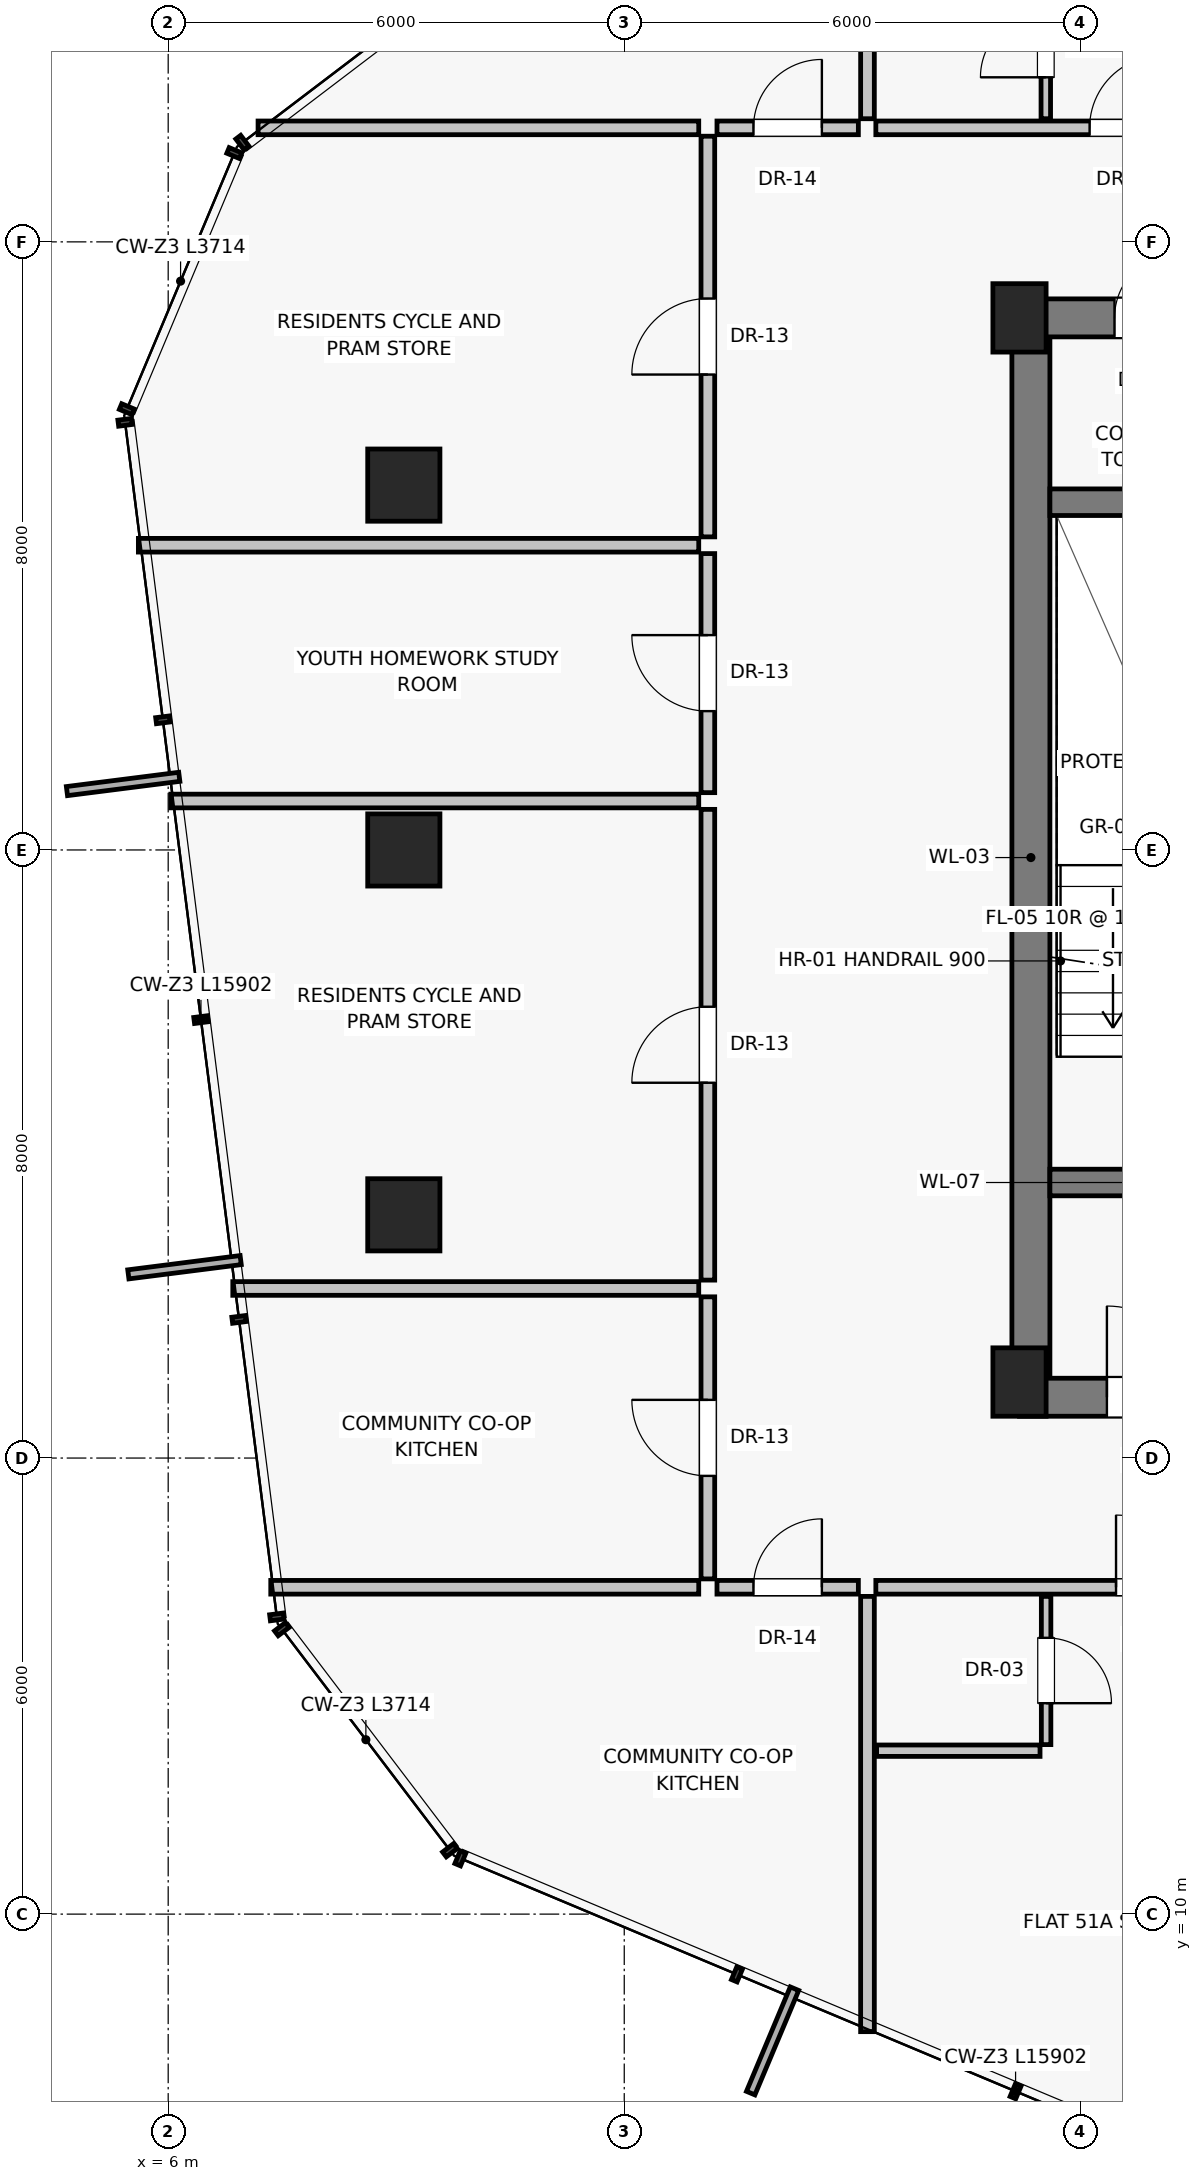
"""IFC4 building model, lengths in metres.
Left out: names, types, materials, properties, quantities, classifications, styles, units other than length and angle.
Written with IfcOpenShell. Run it as: python <this file> out.ifc"""

import sys

from ifc_helpers import new_model, si_unit, direction, frame, frame_2d, origin, origin_2d, place, context, subcontext, project, spatial, rectangle, extrude, source, transform, mapped, element, fill, save


model = new_model("IFC4")
c1 = context("Model", 3, precision=1e-05, world=origin(), true_north=direction((0.0, 1.0)))
c2 = subcontext(c1, "Body", "Model", "MODEL_VIEW")
j1 = project(units=[si_unit("LENGTHUNIT", "METRE"), si_unit("PLANEANGLEUNIT", "RADIAN")], contexts=[c1])
p1 = place(None, origin())
s1 = spatial("IfcSite", under=j1, at=p1, CompositionType="ELEMENT")
p2 = place(p1, origin())
s2 = spatial("IfcBuilding", under=s1, at=p2, CompositionType="ELEMENT")
p3 = place(p2, frame((0.0, 0.0, 182.1)))
s3 = spatial("IfcBuildingStorey", under=s2, at=p3, CompositionType="ELEMENT", Elevation=182.1)
for number, where, z_axis, x_axis in (
    (1, (17.2, 17.0, 0.0), (0.0, 0.0, 1.0), (1.0, 0.0, 0.0)),
    (2, (17.2, 31.0, 0.0), (0.0, 0.0, 1.0), (1.0, 0.0, 0.0)),
):
    element("IfcColumn", number, at=place(p3, frame(where, z_axis=z_axis, x_axis=x_axis)), inside=s3, PredefinedType="PILASTER", context=c2, shape_type="SweptSolid", body=[
        extrude(rectangle(XDim=0.7, YDim=0.9, at=origin_2d()), origin(), (0.0, 0.0, 1.0), 3.25),
    ])
for number, where, z_axis, x_axis in (
    (3, (9.1, 28.8, 0.0), (0.0, 0.0, 1.0), (1.0, 0.0, 0.0)),
    (4, (9.1, 24.0, 0.0), (0.0, 0.0, 1.0), (1.0, 0.0, 0.0)),
    (5, (9.1, 19.2, 0.0), (0.0, 0.0, 1.0), (1.0, 0.0, 0.0)),
):
    element("IfcColumn", number, at=place(p3, frame(where, z_axis=z_axis, x_axis=x_axis)), inside=s3, PredefinedType="COLUMN", context=c2, shape_type="SweptSolid", body=[
        extrude(rectangle(XDim=0.95, YDim=0.95, at=origin_2d()), origin(), (0.0, 0.0, 1.0), 3.25),
    ])
p4 = place(p3, frame((17.35, 16.8, 0.0), z_axis=(0.0, 0.0, 1.0), x_axis=(0.0, 1.0, 0.0)))
e6 = element("IfcWall", 6, at=p4, inside=s3, PredefinedType="SHEAR", context=c2, shape_type="SweptSolid", body=[
    extrude(rectangle(XDim=14.2, YDim=0.5, at=frame_2d((7.1, 0.0))), origin(), (0.0, 0.0, 1.0), 3.015),
])
p5 = place(p3, frame((17.2, 16.8, 0.0), z_axis=(0.0, 0.0, 1.0), x_axis=(1.0, 0.0, 0.0)))
e7 = element("IfcWall", 7, at=p5, inside=s3, PredefinedType="SHEAR", context=c2, shape_type="SweptSolid", body=[
    extrude(rectangle(XDim=5.85, YDim=0.5, at=frame_2d((2.925, 0.0))), origin(), (0.0, 0.0, 1.0), 3.015),
])
p6 = place(p5, frame((1.15, 0.0, 0.0)))
e8 = element("IfcOpeningElement", 8, at=p6, cuts=e7, PredefinedType="OPENING", context=c2, shape_type="SweptSolid", body=[
    extrude(rectangle(XDim=1.2, YDim=2.03, at=frame_2d((0.6, 1.015))), frame((0.0, 0.26, 0.0), z_axis=(0.0, -1.0, 0.0), x_axis=(1.0, 0.0, 0.0)), (0.0, 0.0, 1.0), 0.52),
])
p7 = place(p3, frame((17.2, 31.0, 0.0), z_axis=(0.0, 0.0, 1.0), x_axis=(1.0, 0.0, 0.0)))
e9 = element("IfcWall", 9, at=p7, inside=s3, PredefinedType="SHEAR", context=c2, shape_type="SweptSolid", body=[
    extrude(rectangle(XDim=3.8, YDim=0.5, at=frame_2d((1.9, 0.0))), origin(), (0.0, 0.0, 1.0), 3.015),
])
p8 = place(p7, frame((1.25, 0.0, 0.0)))
e10 = element("IfcOpeningElement", 10, at=p8, cuts=e9, PredefinedType="OPENING", context=c2, shape_type="SweptSolid", body=[
    extrude(rectangle(XDim=0.86, YDim=2.01, at=frame_2d((0.43, 1.005))), frame((0.0, 0.26, 0.0), z_axis=(0.0, -1.0, 0.0), x_axis=(1.0, 0.0, 0.0)), (0.0, 0.0, 1.0), 0.52),
])
p9 = place(p3, frame((17.6, 19.625, 0.0), z_axis=(0.0, 0.0, 1.0), x_axis=(1.0, 0.0, 0.0)))
e11 = element("IfcWall", 11, at=p9, inside=s3, PredefinedType="SHEAR", context=c2, shape_type="SweptSolid", body=[
    extrude(rectangle(XDim=3.375, YDim=0.35, at=frame_2d((1.688, 0.0))), origin(), (0.0, 0.0, 1.0), 3.015),
])
p10 = place(p9, frame((1.05, 0.0, 0.0)))
e12 = element("IfcOpeningElement", 12, at=p10, cuts=e11, PredefinedType="OPENING", context=c2, shape_type="SweptSolid", body=[
    extrude(rectangle(XDim=1.1, YDim=2.03, at=frame_2d((0.55, 1.015))), frame((0.0, 0.185, 0.0), z_axis=(0.0, -1.0, 0.0), x_axis=(1.0, 0.0, 0.0)), (0.0, 0.0, 1.0), 0.37),
])
p11 = place(p3, frame((17.6, 28.575, 0.0), z_axis=(0.0, 0.0, 1.0), x_axis=(1.0, 0.0, 0.0)))
e13 = element("IfcWall", 13, at=p11, inside=s3, PredefinedType="SHEAR", context=c2, shape_type="SweptSolid", body=[
    extrude(rectangle(XDim=3.375, YDim=0.35, at=frame_2d((1.688, 0.0))), origin(), (0.0, 0.0, 1.0), 3.015),
])
p12 = place(p3, frame((15.2, 14.18, 0.0), z_axis=(0.0, 0.0, 1.0), x_axis=(0.0, -1.0, 0.0)))
e14 = element("IfcWall", 14, at=p12, inside=s3, PredefinedType="PARTITIONING", context=c2, shape_type="SweptSolid", body=[
    extrude(rectangle(XDim=5.726, YDim=0.18, at=frame_2d((2.863, 0.0))), origin(), (0.0, 0.0, 1.0), 3.015),
])
p13 = place(p3, frame((15.31, 14.3, 0.0), z_axis=(0.0, 0.0, 1.0), x_axis=(1.0, 0.0, 0.0)))
e15 = element("IfcWall", 15, at=p13, inside=s3, PredefinedType="PARTITIONING", context=c2, shape_type="SweptSolid", body=[
    extrude(rectangle(XDim=5.35, YDim=0.18, at=frame_2d((2.675, 0.0))), origin(), (0.0, 0.0, 1.0), 3.015),
])
p14 = place(p13, frame((3.16, 0.0, 0.0)))
e16 = element("IfcOpeningElement", 16, at=p14, cuts=e15, PredefinedType="OPENING", context=c2, shape_type="SweptSolid", body=[
    extrude(rectangle(XDim=0.95, YDim=2.02, at=frame_2d((0.475, 1.01))), frame((0.0, 0.1, 0.0), z_axis=(0.0, -1.0, 0.0), x_axis=(1.0, 0.0, 0.0)), (0.0, 0.0, 1.0), 0.2),
])
p15 = place(p3, frame((17.55, 14.18, 0.0), z_axis=(0.0, 0.0, 1.0), x_axis=(0.0, -1.0, 0.0)))
e17 = element("IfcWall", 17, at=p15, inside=s3, PredefinedType="PARTITIONING", context=c2, shape_type="SweptSolid", body=[
    extrude(rectangle(XDim=1.95, YDim=0.125, at=frame_2d((0.975, 0.0))), origin(), (0.0, 0.0, 1.0), 3.015),
])
p16 = place(p15, frame((0.545, 0.0, 0.0)))
e18 = element("IfcOpeningElement", 18, at=p16, cuts=e17, PredefinedType="OPENING", context=c2, shape_type="SweptSolid", body=[
    extrude(rectangle(XDim=0.86, YDim=2.01, at=frame_2d((0.43, 1.005))), frame((0.0, 0.073, 0.0), z_axis=(0.0, -1.0, 0.0), x_axis=(1.0, 0.0, 0.0)), (0.0, 0.0, 1.0), 0.145),
])
p17 = place(p3, frame((15.32, 12.15, 0.0), z_axis=(0.0, 0.0, 1.0), x_axis=(1.0, 0.0, 0.0)))
e19 = element("IfcWall", 19, at=p17, inside=s3, PredefinedType="PARTITIONING", context=c2, shape_type="SweptSolid", body=[
    extrude(rectangle(XDim=2.15, YDim=0.15, at=frame_2d((1.075, 0.0))), origin(), (0.0, 0.0, 1.0), 3.015),
])
p18 = place(p3, frame((15.2, 33.62, 0.0), z_axis=(0.0, 0.0, 1.0), x_axis=(0.0, 1.0, 0.0)))
e20 = element("IfcWall", 20, at=p18, inside=s3, PredefinedType="PARTITIONING", context=c2, shape_type="SweptSolid", body=[
    extrude(rectangle(XDim=5.974, YDim=0.18, at=frame_2d((2.987, 0.0))), origin(), (0.0, 0.0, 1.0), 3.015),
])
p19 = place(p3, frame((15.31, 33.5, 0.0), z_axis=(0.0, 0.0, 1.0), x_axis=(1.0, 0.0, 0.0)))
e21 = element("IfcWall", 21, at=p19, inside=s3, PredefinedType="PARTITIONING", context=c2, shape_type="SweptSolid", body=[
    extrude(rectangle(XDim=4.88, YDim=0.18, at=frame_2d((2.44, 0.0))), origin(), (0.0, 0.0, 1.0), 3.015),
])
p20 = place(p19, frame((2.812, 0.0, 0.0)))
e22 = element("IfcOpeningElement", 22, at=p20, cuts=e21, PredefinedType="OPENING", context=c2, shape_type="SweptSolid", body=[
    extrude(rectangle(XDim=0.95, YDim=2.02, at=frame_2d((0.475, 1.01))), frame((0.0, 0.1, 0.0), z_axis=(0.0, -1.0, 0.0), x_axis=(1.0, 0.0, 0.0)), (0.0, 0.0, 1.0), 0.2),
])
p21 = place(p3, frame((17.546, 33.62, 0.0), z_axis=(0.0, 0.0, 1.0), x_axis=(0.0, 1.0, 0.0)))
e23 = element("IfcWall", 23, at=p21, inside=s3, PredefinedType="PARTITIONING", context=c2, shape_type="SweptSolid", body=[
    extrude(rectangle(XDim=1.95, YDim=0.125, at=frame_2d((0.975, 0.0))), origin(), (0.0, 0.0, 1.0), 3.015),
])
p22 = place(p21, frame((0.545, 0.0, 0.0)))
e24 = element("IfcOpeningElement", 24, at=p22, cuts=e23, PredefinedType="OPENING", context=c2, shape_type="SweptSolid", body=[
    extrude(rectangle(XDim=0.86, YDim=2.01, at=frame_2d((0.43, 1.005))), frame((0.0, 0.073, 0.0), z_axis=(0.0, -1.0, 0.0), x_axis=(1.0, 0.0, 0.0)), (0.0, 0.0, 1.0), 0.145),
])
p23 = place(p3, frame((12.98, 14.3, 0.0), z_axis=(0.0, 0.0, 1.0), x_axis=(-1.0, 0.0, 0.0)))
e25 = element("IfcWall", 25, at=p23, inside=s3, PredefinedType="PARTITIONING", context=c2, shape_type="SweptSolid", body=[
    extrude(rectangle(XDim=5.63, YDim=0.18, at=frame_2d((2.815, 0.0))), origin(), (0.0, 0.0, 1.0), 3.015),
])
p24 = place(p3, frame((12.98, 33.5, 0.0), z_axis=(0.0, 0.0, 1.0), x_axis=(-1.0, 0.0, 0.0)))
e26 = element("IfcWall", 26, at=p24, inside=s3, PredefinedType="PARTITIONING", context=c2, shape_type="SweptSolid", body=[
    extrude(rectangle(XDim=5.797, YDim=0.18, at=frame_2d((2.899, 0.0))), origin(), (0.0, 0.0, 1.0), 3.015),
])
p25 = place(p3, frame((13.1, 14.41, 0.0), z_axis=(0.0, 0.0, 1.0), x_axis=(0.0, 1.0, 0.0)))
e27 = element("IfcWall", 27, at=p25, inside=s3, PredefinedType="PARTITIONING", context=c2, shape_type="SweptSolid", body=[
    extrude(rectangle(XDim=3.711, YDim=0.18, at=frame_2d((1.855, 0.0))), origin(), (0.0, 0.0, 1.0), 2.662),
])
p26 = place(p25, frame((1.355, 0.0, 0.0)))
e28 = element("IfcOpeningElement", 28, at=p26, cuts=e27, PredefinedType="OPENING", context=c2, shape_type="SweptSolid", body=[
    extrude(rectangle(XDim=1.0, YDim=2.01, at=frame_2d((0.5, 1.005))), frame((0.0, 0.1, 0.0), z_axis=(0.0, -1.0, 0.0), x_axis=(1.0, 0.0, 0.0)), (0.0, 0.0, 1.0), 0.2),
])
p27 = place(p3, frame((13.1, 18.341, 0.0), z_axis=(0.0, 0.0, 1.0), x_axis=(0.0, 1.0, 0.0)))
e29 = element("IfcWall", 29, at=p27, inside=s3, PredefinedType="PARTITIONING", context=c2, shape_type="SweptSolid", body=[
    extrude(rectangle(XDim=6.193, YDim=0.18, at=frame_2d((3.096, 0.0))), origin(), (0.0, 0.0, 1.0), 2.662),
])
p28 = place(p27, frame((2.596, 0.0, 0.0)))
e30 = element("IfcOpeningElement", 30, at=p28, cuts=e29, PredefinedType="OPENING", context=c2, shape_type="SweptSolid", body=[
    extrude(rectangle(XDim=1.0, YDim=2.01, at=frame_2d((0.5, 1.005))), frame((0.0, 0.1, 0.0), z_axis=(0.0, -1.0, 0.0), x_axis=(1.0, 0.0, 0.0)), (0.0, 0.0, 1.0), 0.2),
])
p29 = place(p3, frame((12.98, 18.231, 0.0), z_axis=(0.0, 0.0, 1.0), x_axis=(-1.0, 0.0, 0.0)))
e31 = element("IfcWall", 31, at=p29, inside=s3, PredefinedType="PARTITIONING", context=c2, shape_type="SweptSolid", body=[
    extrude(rectangle(XDim=6.13, YDim=0.18, at=frame_2d((3.065, 0.0))), origin(), (0.0, 0.0, 1.0), 2.469),
])
p30 = place(p3, frame((12.98, 24.644, 0.0), z_axis=(0.0, 0.0, 1.0), x_axis=(-1.0, 0.0, 0.0)))
e32 = element("IfcWall", 32, at=p30, inside=s3, PredefinedType="PARTITIONING", context=c2, shape_type="SweptSolid", body=[
    extrude(rectangle(XDim=6.945, YDim=0.18, at=frame_2d((3.472, 0.0))), origin(), (0.0, 0.0, 1.0), 3.015),
])
p31 = place(p3, frame((13.1, 24.754, 0.0), z_axis=(0.0, 0.0, 1.0), x_axis=(0.0, 1.0, 0.0)))
e33 = element("IfcWall", 33, at=p31, inside=s3, PredefinedType="PARTITIONING", context=c2, shape_type="SweptSolid", body=[
    extrude(rectangle(XDim=3.145, YDim=0.18, at=frame_2d((1.573, 0.0))), origin(), (0.0, 0.0, 1.0), 2.662),
])
p32 = place(p31, frame((1.073, 0.0, 0.0)))
e34 = element("IfcOpeningElement", 34, at=p32, cuts=e33, PredefinedType="OPENING", context=c2, shape_type="SweptSolid", body=[
    extrude(rectangle(XDim=1.0, YDim=2.01, at=frame_2d((0.5, 1.005))), frame((0.0, 0.1, 0.0), z_axis=(0.0, -1.0, 0.0), x_axis=(1.0, 0.0, 0.0)), (0.0, 0.0, 1.0), 0.2),
])
p33 = place(p3, frame((13.1, 28.119, 0.0), z_axis=(0.0, 0.0, 1.0), x_axis=(0.0, 1.0, 0.0)))
e35 = element("IfcWall", 35, at=p33, inside=s3, PredefinedType="PARTITIONING", context=c2, shape_type="SweptSolid", body=[
    extrude(rectangle(XDim=5.271, YDim=0.18, at=frame_2d((2.635, 0.0))), origin(), (0.0, 0.0, 1.0), 2.662),
])
p34 = place(p33, frame((2.135, 0.0, 0.0)))
e36 = element("IfcOpeningElement", 36, at=p34, cuts=e35, PredefinedType="OPENING", context=c2, shape_type="SweptSolid", body=[
    extrude(rectangle(XDim=1.0, YDim=2.01, at=frame_2d((0.5, 1.005))), frame((0.0, 0.1, 0.0), z_axis=(0.0, -1.0, 0.0), x_axis=(1.0, 0.0, 0.0)), (0.0, 0.0, 1.0), 0.2),
])
p35 = place(p3, frame((12.98, 28.009, 0.0), z_axis=(0.0, 0.0, 1.0), x_axis=(-1.0, 0.0, 0.0)))
e37 = element("IfcWall", 37, at=p35, inside=s3, PredefinedType="PARTITIONING", context=c2, shape_type="SweptSolid", body=[
    extrude(rectangle(XDim=7.372, YDim=0.18, at=frame_2d((3.686, 0.0))), origin(), (0.0, 0.0, 1.0), 3.015),
])
p36 = place(p3, frame((13.22, 14.3, 0.0), z_axis=(0.0, 0.0, 1.0), x_axis=(1.0, 0.0, 0.0)))
e38 = element("IfcWall", 38, at=p36, inside=s3, PredefinedType="PARTITIONING", context=c2, shape_type="SweptSolid", body=[
    extrude(rectangle(XDim=1.86, YDim=0.18, at=frame_2d((0.93, 0.0))), origin(), (0.0, 0.0, 1.0), 3.015),
])
p37 = place(p36, frame((0.48, 0.0, 0.0)))
e39 = element("IfcOpeningElement", 39, at=p37, cuts=e38, PredefinedType="OPENING", context=c2, shape_type="SweptSolid", body=[
    extrude(rectangle(XDim=0.9, YDim=2.01, at=frame_2d((0.45, 1.005))), frame((0.0, 0.1, 0.0), z_axis=(0.0, -1.0, 0.0), x_axis=(1.0, 0.0, 0.0)), (0.0, 0.0, 1.0), 0.2),
])
p38 = place(p3, frame((13.22, 33.5, 0.0), z_axis=(0.0, 0.0, 1.0), x_axis=(1.0, 0.0, 0.0)))
e40 = element("IfcWall", 40, at=p38, inside=s3, PredefinedType="PARTITIONING", context=c2, shape_type="SweptSolid", body=[
    extrude(rectangle(XDim=1.86, YDim=0.18, at=frame_2d((0.93, 0.0))), origin(), (0.0, 0.0, 1.0), 3.015),
])
p39 = place(p38, frame((0.48, 0.0, 0.0)))
e41 = element("IfcOpeningElement", 41, at=p39, cuts=e40, PredefinedType="OPENING", context=c2, shape_type="SweptSolid", body=[
    extrude(rectangle(XDim=0.9, YDim=2.01, at=frame_2d((0.45, 1.005))), frame((0.0, 0.1, 0.0), z_axis=(0.0, -1.0, 0.0), x_axis=(1.0, 0.0, 0.0)), (0.0, 0.0, 1.0), 0.2),
])
m1 = source(origin(), c2, "Body", "SweptSolid", [
    extrude(rectangle(XDim=1.2, YDim=2.03, at=frame_2d((0.6, 1.015))), frame((0.0, 0.025, 0.0), z_axis=(0.0, -1.0, 0.0), x_axis=(1.0, 0.0, 0.0)), (0.0, 0.0, 1.0), 0.05),
])
p40 = place(p6, origin())
e42 = element("IfcDoor", 42, at=p40, inside=s3, OperationType="SINGLE_SWING_LEFT", PredefinedType="DOOR", context=c2, shape_type="MappedRepresentation", body=[
    mapped(m1, transform((0.0, 0.0, 0.0), scale=1.0)),
])
fill(e8, e42)
m2 = source(origin(), c2, "Body", "SweptSolid", [
    extrude(rectangle(XDim=0.86, YDim=2.01, at=frame_2d((0.43, 1.005))), frame((0.0, 0.025, 0.0), z_axis=(0.0, -1.0, 0.0), x_axis=(1.0, 0.0, 0.0)), (0.0, 0.0, 1.0), 0.05),
])
p41 = place(p8, origin())
e43 = element("IfcDoor", 43, at=p41, inside=s3, OperationType="SINGLE_SWING_RIGHT", PredefinedType="DOOR", context=c2, shape_type="MappedRepresentation", body=[
    mapped(m2, transform((0.0, 0.0, 0.0), scale=1.0)),
])
fill(e10, e43)
m3 = source(origin(), c2, "Body", "SweptSolid", [
    extrude(rectangle(XDim=0.95, YDim=2.02, at=frame_2d((0.475, 1.01))), frame((0.0, 0.025, 0.0), z_axis=(0.0, -1.0, 0.0), x_axis=(1.0, 0.0, 0.0)), (0.0, 0.0, 1.0), 0.05),
])
p42 = place(p14, origin())
e44 = element("IfcDoor", 44, at=p42, inside=s3, OperationType="SINGLE_SWING_LEFT", PredefinedType="DOOR", context=c2, shape_type="MappedRepresentation", body=[
    mapped(m3, transform((0.0, 0.0, 0.0), scale=1.0)),
])
fill(e16, e44)
p43 = place(p16, origin())
e45 = element("IfcDoor", 45, at=p43, inside=s3, OperationType="SINGLE_SWING_RIGHT", PredefinedType="DOOR", context=c2, shape_type="MappedRepresentation", body=[
    mapped(m2, transform((0.0, 0.0, 0.0), scale=1.0)),
])
fill(e18, e45)
p44 = place(p20, origin())
e46 = element("IfcDoor", 46, at=p44, inside=s3, OperationType="SINGLE_SWING_RIGHT", PredefinedType="DOOR", context=c2, shape_type="MappedRepresentation", body=[
    mapped(m3, transform((0.0, 0.0, 0.0), scale=1.0)),
])
fill(e22, e46)
p45 = place(p22, origin())
e47 = element("IfcDoor", 47, at=p45, inside=s3, OperationType="SINGLE_SWING_LEFT", PredefinedType="DOOR", context=c2, shape_type="MappedRepresentation", body=[
    mapped(m2, transform((0.0, 0.0, 0.0), scale=1.0)),
])
fill(e24, e47)
m4 = source(origin(), c2, "Body", "SweptSolid", [
    extrude(rectangle(XDim=1.0, YDim=2.01, at=frame_2d((0.5, 1.005))), frame((0.0, 0.025, 0.0), z_axis=(0.0, -1.0, 0.0), x_axis=(1.0, 0.0, 0.0)), (0.0, 0.0, 1.0), 0.05),
])
p46 = place(p26, origin())
e48 = element("IfcDoor", 48, at=p46, inside=s3, OperationType="SINGLE_SWING_RIGHT", PredefinedType="DOOR", context=c2, shape_type="MappedRepresentation", body=[
    mapped(m4, transform((0.0, 0.0, 0.0), scale=1.0)),
])
fill(e28, e48)
p47 = place(p28, origin())
e49 = element("IfcDoor", 49, at=p47, inside=s3, OperationType="SINGLE_SWING_LEFT", PredefinedType="DOOR", context=c2, shape_type="MappedRepresentation", body=[
    mapped(m4, transform((0.0, 0.0, 0.0), scale=1.0)),
])
fill(e30, e49)
p48 = place(p32, origin())
e50 = element("IfcDoor", 50, at=p48, inside=s3, OperationType="SINGLE_SWING_RIGHT", PredefinedType="DOOR", context=c2, shape_type="MappedRepresentation", body=[
    mapped(m4, transform((0.0, 0.0, 0.0), scale=1.0)),
])
fill(e34, e50)
p49 = place(p34, origin())
e51 = element("IfcDoor", 51, at=p49, inside=s3, OperationType="SINGLE_SWING_LEFT", PredefinedType="DOOR", context=c2, shape_type="MappedRepresentation", body=[
    mapped(m4, transform((0.0, 0.0, 0.0), scale=1.0)),
])
fill(e36, e51)
m5 = source(origin(), c2, "Body", "SweptSolid", [
    extrude(rectangle(XDim=0.9, YDim=2.01, at=frame_2d((0.45, 1.005))), frame((0.0, 0.025, 0.0), z_axis=(0.0, -1.0, 0.0), x_axis=(1.0, 0.0, 0.0)), (0.0, 0.0, 1.0), 0.05),
])
p50 = place(p37, origin())
e52 = element("IfcDoor", 52, at=p50, inside=s3, OperationType="SINGLE_SWING_RIGHT", PredefinedType="DOOR", context=c2, shape_type="MappedRepresentation", body=[
    mapped(m5, transform((0.0, 0.0, 0.0), scale=1.0)),
])
fill(e39, e52)
p51 = place(p39, origin())
e53 = element("IfcDoor", 53, at=p51, inside=s3, OperationType="SINGLE_SWING_RIGHT", PredefinedType="DOOR", context=c2, shape_type="MappedRepresentation", body=[
    mapped(m5, transform((0.0, 0.0, 0.0), scale=1.0)),
])
fill(e41, e53)
save(model, sys.argv[1])
